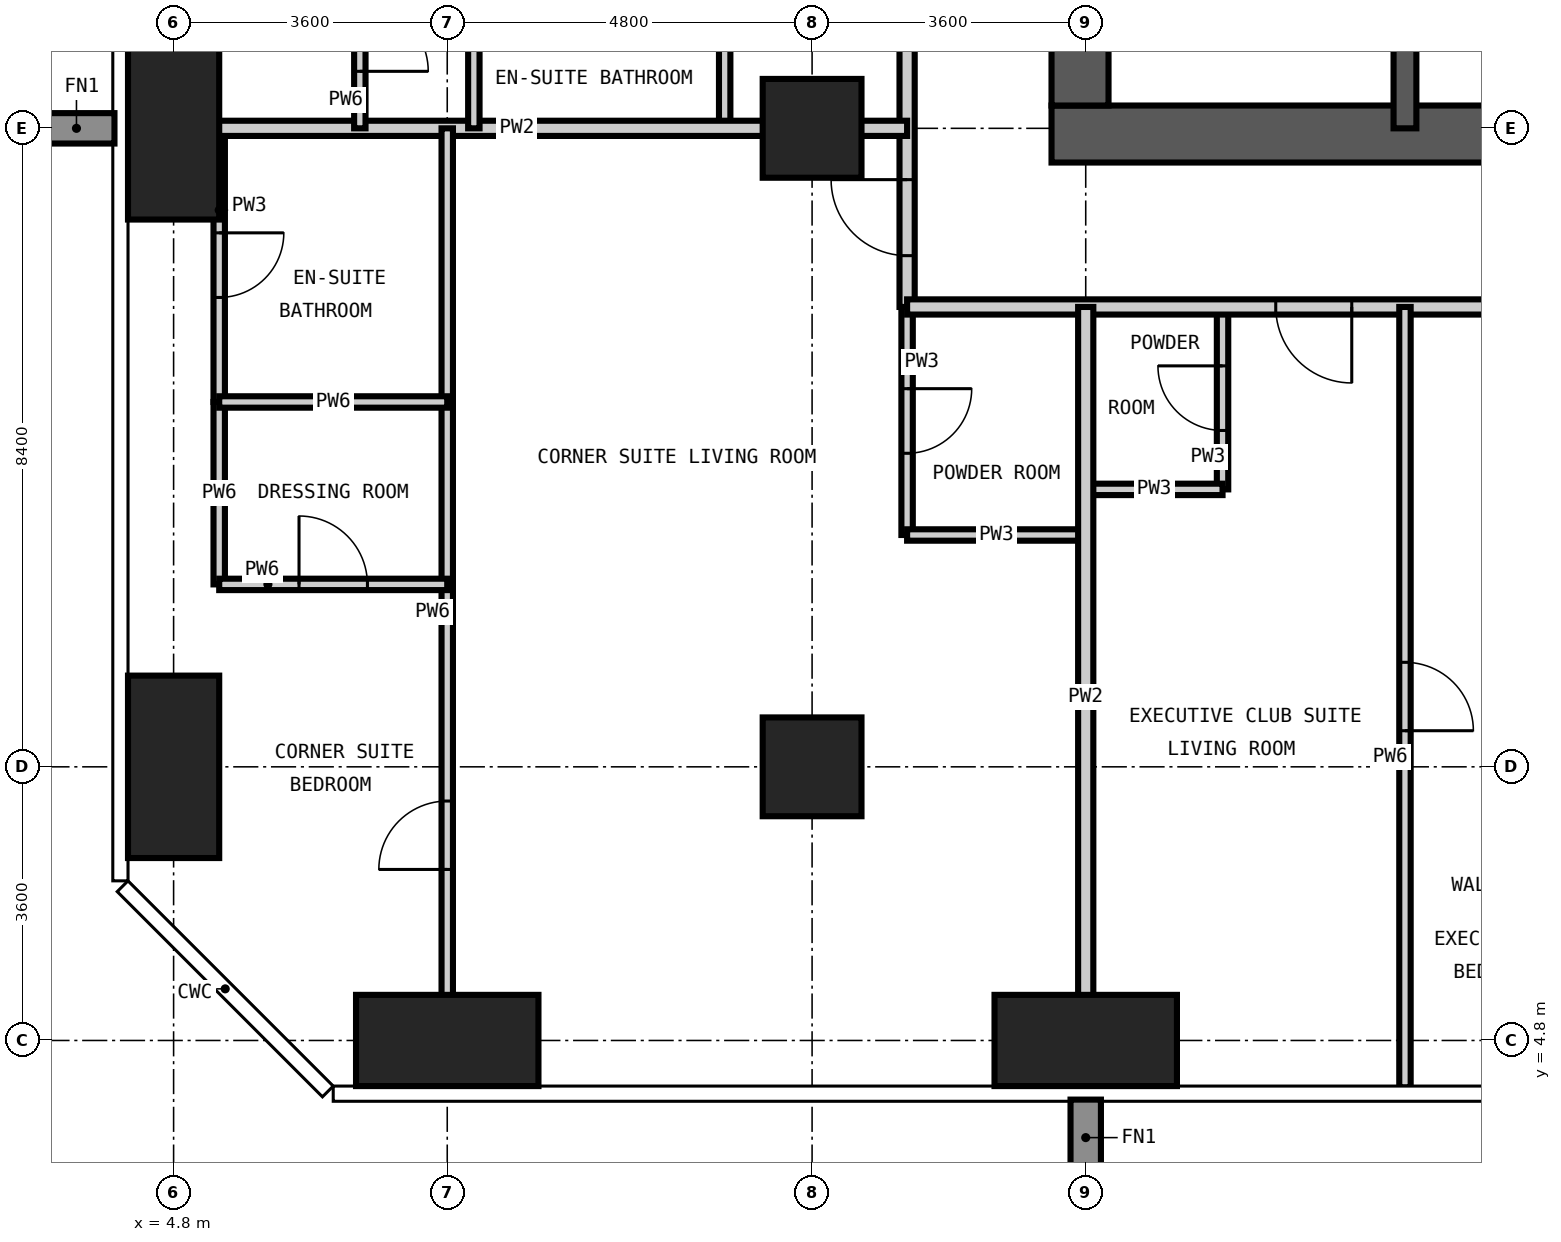
"""IFC4 building model, lengths in metres.
Left out: names, types, materials, properties, quantities, classifications, styles, units other than length and angle.
Written with IfcOpenShell. Run it as: python <this file> out.ifc"""

import sys

from ifc_helpers import new_model, si_unit, direction, frame, frame_2d, origin, origin_2d, place, context, subcontext, project, spatial, rectangle, extrude, element, fill, save


model = new_model("IFC4")
c1 = context("Model", 3, precision=1e-05, world=origin(), true_north=direction((0.0, 1.0)))
c2 = subcontext(c1, "Body", "Model", "MODEL_VIEW")
j1 = project(units=[si_unit("LENGTHUNIT", "METRE"), si_unit("PLANEANGLEUNIT", "RADIAN")], contexts=[c1])
p1 = place(None, origin())
s1 = spatial("IfcSite", under=j1, at=p1, CompositionType="ELEMENT")
p2 = place(p1, origin())
s2 = spatial("IfcBuilding", under=s1, at=p2, CompositionType="ELEMENT")
p3 = place(p2, frame((0.0, 0.0, 177.0)))
s3 = spatial("IfcBuildingStorey", under=s2, at=p3, CompositionType="ELEMENT", Elevation=177.0)
for number, where, z_axis, x_axis in (
    (1, (4.8, 8.4, -0.35), (0.0, 0.0, 1.0), (1.0, 0.0, 0.0)),
    (2, (4.8, 16.8, -0.35), (0.0, 0.0, 1.0), (1.0, 0.0, 0.0)),
):
    element("IfcColumn", number, at=place(p3, frame(where, z_axis=z_axis, x_axis=x_axis)), inside=s3, PredefinedType="COLUMN", context=c2, shape_type="SweptSolid", body=[
        extrude(rectangle(XDim=1.2, YDim=2.4, at=origin_2d()), origin(), (0.0, 0.0, 1.0), 3.6),
    ])
p4 = place(p3, frame((8.4, 4.8, -0.35), z_axis=(0.0, 0.0, 1.0), x_axis=(1.0, 0.0, 0.0)))
e3 = element("IfcColumn", 3, at=p4, inside=s3, PredefinedType="COLUMN", context=c2, shape_type="SweptSolid", body=[
    extrude(rectangle(XDim=2.4, YDim=1.2, at=origin_2d()), origin(), (0.0, 0.0, 1.0), 3.6),
])
for number, where, z_axis, x_axis in (
    (4, (13.2, 8.4, -0.35), (0.0, 0.0, 1.0), (1.0, 0.0, 0.0)),
    (5, (13.2, 16.8, -0.35), (0.0, 0.0, 1.0), (1.0, 0.0, 0.0)),
):
    element("IfcColumn", number, at=place(p3, frame(where, z_axis=z_axis, x_axis=x_axis)), inside=s3, PredefinedType="COLUMN", context=c2, shape_type="SweptSolid", body=[
        extrude(rectangle(XDim=1.3, YDim=1.3, at=origin_2d()), origin(), (0.0, 0.0, 1.0), 3.6),
    ])
p5 = place(p3, frame((16.8, 4.8, -0.35), z_axis=(0.0, 0.0, 1.0), x_axis=(1.0, 0.0, 0.0)))
e6 = element("IfcColumn", 6, at=p5, inside=s3, PredefinedType="COLUMN", context=c2, shape_type="SweptSolid", body=[
    extrude(rectangle(XDim=2.4, YDim=1.2, at=origin_2d()), origin(), (0.0, 0.0, 1.0), 3.6),
])
p6 = place(p3, frame((16.35, 16.725, -0.35), z_axis=(0.0, 0.0, 1.0), x_axis=(1.0, 0.0, 0.0)))
e7 = element("IfcWall", 7, at=p6, inside=s3, PredefinedType="SHEAR", context=c2, shape_type="SweptSolid", body=[
    extrude(rectangle(XDim=26.1, YDim=0.75, at=frame_2d((13.05, 0.0))), origin(), (0.0, 0.0, 1.0), 3.6),
])
p7 = place(p6, frame((12.55, 0.0, 0.35)))
e8 = element("IfcOpeningElement", 8, at=p7, cuts=e7, PredefinedType="OPENING", context=c2, shape_type="SweptSolid", body=[
    extrude(rectangle(XDim=1.0, YDim=2.1, at=frame_2d((0.5, 1.05))), frame((0.0, 0.385, 0.0), z_axis=(0.0, -1.0, 0.0), x_axis=(1.0, 0.0, 0.0)), (0.0, 0.0, 1.0), 0.77),
])
p8 = place(p6, frame((18.85, 0.0, 0.35)))
e9 = element("IfcOpeningElement", 9, at=p8, cuts=e7, PredefinedType="OPENING", context=c2, shape_type="SweptSolid", body=[
    extrude(rectangle(XDim=1.0, YDim=2.1, at=frame_2d((0.5, 1.05))), frame((0.0, 0.385, 0.0), z_axis=(0.0, -1.0, 0.0), x_axis=(1.0, 0.0, 0.0)), (0.0, 0.0, 1.0), 0.77),
])
p9 = place(p3, frame((16.725, 41.7, -0.35), z_axis=(0.0, 0.0, 1.0), x_axis=(0.0, -1.0, 0.0)))
e10 = element("IfcWall", 10, at=p9, inside=s3, PredefinedType="SHEAR", context=c2, shape_type="SweptSolid", body=[
    extrude(rectangle(XDim=24.6, YDim=0.75, at=frame_2d((12.3, 0.0))), origin(), (0.0, 0.0, 1.0), 3.6),
])
p10 = place(p9, frame((11.4, 0.0, 0.35)))
e11 = element("IfcOpeningElement", 11, at=p10, cuts=e10, PredefinedType="OPENING", context=c2, shape_type="SweptSolid", body=[
    extrude(rectangle(XDim=1.8, YDim=2.2, at=frame_2d((0.9, 1.1))), frame((0.0, 0.385, 0.0), z_axis=(0.0, -1.0, 0.0), x_axis=(1.0, 0.0, 0.0)), (0.0, 0.0, 1.0), 0.77),
])
p11 = place(p9, frame((20.2, 0.0, 0.35)))
e12 = element("IfcOpeningElement", 12, at=p11, cuts=e10, PredefinedType="OPENING", context=c2, shape_type="SweptSolid", body=[
    extrude(rectangle(XDim=1.0, YDim=2.1, at=frame_2d((0.5, 1.05))), frame((0.0, 0.385, 0.0), z_axis=(0.0, -1.0, 0.0), x_axis=(1.0, 0.0, 0.0)), (0.0, 0.0, 1.0), 0.77),
])
p12 = place(p9, frame((5.5, 0.0, 0.35)))
e13 = element("IfcOpeningElement", 13, at=p12, cuts=e10, PredefinedType="OPENING", context=c2, shape_type="SweptSolid", body=[
    extrude(rectangle(XDim=1.0, YDim=2.1, at=frame_2d((0.5, 1.05))), frame((0.0, 0.385, 0.0), z_axis=(0.0, -1.0, 0.0), x_axis=(1.0, 0.0, 0.0)), (0.0, 0.0, 1.0), 0.77),
])
p13 = place(p3, frame((21.0, 16.8, -0.35), z_axis=(0.0, 0.0, 1.0), x_axis=(0.0, 1.0, 0.0)))
e14 = element("IfcWall", 14, at=p13, inside=s3, PredefinedType="SHEAR", context=c2, shape_type="SweptSolid", body=[
    extrude(rectangle(XDim=2.8, YDim=0.3, at=frame_2d((1.4, 0.0))), origin(), (0.0, 0.0, 1.0), 3.6),
])
p14 = place(p3, frame((5.4, 13.2, 0.0), z_axis=(0.0, 0.0, 1.0), x_axis=(0.0, 1.0, 0.0)))
e15 = element("IfcWall", 15, at=p14, inside=s3, PredefinedType="PARTITIONING", context=c2, shape_type="SweptSolid", body=[
    extrude(rectangle(XDim=3.6, YDim=0.15, at=frame_2d((1.8, 0.0))), origin(), (0.0, 0.0, 1.0), 3.25),
])
p15 = place(p14, frame((1.375, 0.0, 0.0)))
e16 = element("IfcOpeningElement", 16, at=p15, cuts=e15, PredefinedType="OPENING", context=c2, shape_type="SweptSolid", body=[
    extrude(rectangle(XDim=0.85, YDim=2.1, at=frame_2d((0.425, 1.05))), frame((0.0, 0.085, 0.0), z_axis=(0.0, -1.0, 0.0), x_axis=(1.0, 0.0, 0.0)), (0.0, 0.0, 1.0), 0.17),
])
p16 = place(p3, frame((12.05, 16.8, 0.0), z_axis=(0.0, 0.0, 1.0), x_axis=(0.0, 1.0, 0.0)))
e17 = element("IfcWall", 17, at=p16, inside=s3, PredefinedType="PARTITIONING", context=c2, shape_type="SweptSolid", body=[
    extrude(rectangle(XDim=2.4, YDim=0.15, at=frame_2d((1.2, 0.0))), origin(), (0.0, 0.0, 1.0), 3.25),
])
p17 = place(p3, frame((14.45, 11.45, 0.0), z_axis=(0.0, 0.0, 1.0), x_axis=(0.0, 1.0, 0.0)))
e18 = element("IfcWall", 18, at=p17, inside=s3, PredefinedType="PARTITIONING", context=c2, shape_type="SweptSolid", body=[
    extrude(rectangle(XDim=3.0, YDim=0.15, at=frame_2d((1.5, 0.0))), origin(), (0.0, 0.0, 1.0), 3.25),
])
p18 = place(p17, frame((1.075, 0.0, 0.0)))
e19 = element("IfcOpeningElement", 19, at=p18, cuts=e18, PredefinedType="OPENING", context=c2, shape_type="SweptSolid", body=[
    extrude(rectangle(XDim=0.85, YDim=2.1, at=frame_2d((0.425, 1.05))), frame((0.0, 0.085, 0.0), z_axis=(0.0, -1.0, 0.0), x_axis=(1.0, 0.0, 0.0)), (0.0, 0.0, 1.0), 0.17),
])
p19 = place(p3, frame((18.6, 12.05, 0.0), z_axis=(0.0, 0.0, 1.0), x_axis=(0.0, 1.0, 0.0)))
e20 = element("IfcWall", 20, at=p19, inside=s3, PredefinedType="PARTITIONING", context=c2, shape_type="SweptSolid", body=[
    extrude(rectangle(XDim=2.4, YDim=0.15, at=frame_2d((1.2, 0.0))), origin(), (0.0, 0.0, 1.0), 3.25),
])
p20 = place(p19, frame((0.775, 0.0, 0.0)))
e21 = element("IfcOpeningElement", 21, at=p20, cuts=e20, PredefinedType="OPENING", context=c2, shape_type="SweptSolid", body=[
    extrude(rectangle(XDim=0.85, YDim=2.1, at=frame_2d((0.425, 1.05))), frame((0.0, 0.085, 0.0), z_axis=(0.0, -1.0, 0.0), x_axis=(1.0, 0.0, 0.0)), (0.0, 0.0, 1.0), 0.17),
])
p21 = place(p3, frame((14.45, 11.45, 0.0), z_axis=(0.0, 0.0, 1.0), x_axis=(1.0, 0.0, 0.0)))
e22 = element("IfcWall", 22, at=p21, inside=s3, PredefinedType="PARTITIONING", context=c2, shape_type="SweptSolid", body=[
    extrude(rectangle(XDim=2.35, YDim=0.15, at=frame_2d((1.175, 0.0))), origin(), (0.0, 0.0, 1.0), 3.25),
])
p22 = place(p3, frame((16.8, 12.05, 0.0), z_axis=(0.0, 0.0, 1.0), x_axis=(1.0, 0.0, 0.0)))
e23 = element("IfcWall", 23, at=p22, inside=s3, PredefinedType="PARTITIONING", context=c2, shape_type="SweptSolid", body=[
    extrude(rectangle(XDim=1.8, YDim=0.15, at=frame_2d((0.9, 0.0))), origin(), (0.0, 0.0, 1.0), 3.25),
])
p23 = place(p3, frame((14.45, 14.45, 0.0), z_axis=(0.0, 0.0, 1.0), x_axis=(0.0, 1.0, 0.0)))
e24 = element("IfcWall", 24, at=p23, inside=s3, PredefinedType="PARTITIONING", context=c2, shape_type="SweptSolid", body=[
    extrude(rectangle(XDim=31.1, YDim=0.2, at=frame_2d((15.55, 0.0))), origin(), (0.0, 0.0, 1.0), 3.25),
])
p24 = place(p23, frame((6.05, 0.0, 0.0)))
e25 = element("IfcOpeningElement", 25, at=p24, cuts=e24, PredefinedType="OPENING", context=c2, shape_type="SweptSolid", body=[
    extrude(rectangle(XDim=1.0, YDim=2.2, at=frame_2d((0.5, 1.1))), frame((0.0, 0.11, 0.0), z_axis=(0.0, -1.0, 0.0), x_axis=(1.0, 0.0, 0.0)), (0.0, 0.0, 1.0), 0.22),
])
p25 = place(p23, frame((11.95, 0.0, 0.0)))
e26 = element("IfcOpeningElement", 26, at=p25, cuts=e24, PredefinedType="OPENING", context=c2, shape_type="SweptSolid", body=[
    extrude(rectangle(XDim=1.8, YDim=2.4, at=frame_2d((0.9, 1.2))), frame((0.0, 0.11, 0.0), z_axis=(0.0, -1.0, 0.0), x_axis=(1.0, 0.0, 0.0)), (0.0, 0.0, 1.0), 0.22),
])
p26 = place(p23, frame((19.575, 0.0, 0.0)))
e27 = element("IfcOpeningElement", 27, at=p26, cuts=e24, PredefinedType="OPENING", context=c2, shape_type="SweptSolid", body=[
    extrude(rectangle(XDim=1.0, YDim=2.2, at=frame_2d((0.5, 1.1))), frame((0.0, 0.11, 0.0), z_axis=(0.0, -1.0, 0.0), x_axis=(1.0, 0.0, 0.0)), (0.0, 0.0, 1.0), 0.22),
])
p27 = place(p23, frame((24.95, 0.0, 0.0)))
e28 = element("IfcOpeningElement", 28, at=p27, cuts=e24, PredefinedType="OPENING", context=c2, shape_type="SweptSolid", body=[
    extrude(rectangle(XDim=1.0, YDim=2.2, at=frame_2d((0.5, 1.1))), frame((0.0, 0.11, 0.0), z_axis=(0.0, -1.0, 0.0), x_axis=(1.0, 0.0, 0.0)), (0.0, 0.0, 1.0), 0.22),
])
p28 = place(p23, frame((0.675, 0.0, 0.0)))
e29 = element("IfcOpeningElement", 29, at=p28, cuts=e24, PredefinedType="OPENING", context=c2, shape_type="SweptSolid", body=[
    extrude(rectangle(XDim=1.0, YDim=2.2, at=frame_2d((0.5, 1.1))), frame((0.0, 0.11, 0.0), z_axis=(0.0, -1.0, 0.0), x_axis=(1.0, 0.0, 0.0)), (0.0, 0.0, 1.0), 0.22),
])
p29 = place(p23, frame((28.825, 0.0, 0.0)))
e30 = element("IfcOpeningElement", 30, at=p29, cuts=e24, PredefinedType="OPENING", context=c2, shape_type="SweptSolid", body=[
    extrude(rectangle(XDim=1.0, YDim=2.2, at=frame_2d((0.5, 1.1))), frame((0.0, 0.11, 0.0), z_axis=(0.0, -1.0, 0.0), x_axis=(1.0, 0.0, 0.0)), (0.0, 0.0, 1.0), 0.22),
])
p30 = place(p3, frame((44.95, 14.45, 0.0), z_axis=(0.0, 0.0, 1.0), x_axis=(-1.0, 0.0, 0.0)))
e31 = element("IfcWall", 31, at=p30, inside=s3, PredefinedType="PARTITIONING", context=c2, shape_type="SweptSolid", body=[
    extrude(rectangle(XDim=30.5, YDim=0.2, at=frame_2d((15.25, 0.0))), origin(), (0.0, 0.0, 1.0), 3.25),
])
p31 = place(p30, frame((24.65, 0.0, 0.0)))
e32 = element("IfcOpeningElement", 32, at=p31, cuts=e31, PredefinedType="OPENING", context=c2, shape_type="SweptSolid", body=[
    extrude(rectangle(XDim=1.0, YDim=2.2, at=frame_2d((0.5, 1.1))), frame((0.0, 0.11, 0.0), z_axis=(0.0, -1.0, 0.0), x_axis=(1.0, 0.0, 0.0)), (0.0, 0.0, 1.0), 0.22),
])
p32 = place(p30, frame((13.85, 0.0, 0.0)))
e33 = element("IfcOpeningElement", 33, at=p32, cuts=e31, PredefinedType="OPENING", context=c2, shape_type="SweptSolid", body=[
    extrude(rectangle(XDim=1.0, YDim=2.2, at=frame_2d((0.5, 1.1))), frame((0.0, 0.11, 0.0), z_axis=(0.0, -1.0, 0.0), x_axis=(1.0, 0.0, 0.0)), (0.0, 0.0, 1.0), 0.22),
])
p33 = place(p30, frame((7.85, 0.0, 0.0)))
e34 = element("IfcOpeningElement", 34, at=p33, cuts=e31, PredefinedType="OPENING", context=c2, shape_type="SweptSolid", body=[
    extrude(rectangle(XDim=1.0, YDim=2.2, at=frame_2d((0.5, 1.1))), frame((0.0, 0.11, 0.0), z_axis=(0.0, -1.0, 0.0), x_axis=(1.0, 0.0, 0.0)), (0.0, 0.0, 1.0), 0.22),
])
for number, where, z_axis, x_axis in (
    (35, (16.8, 4.182, 0.0), (0.0, 0.0, 1.0), (0.0, 1.0, 0.0)),
    (36, (4.182, 16.8, 0.0), (0.0, 0.0, 1.0), (1.0, 0.0, 0.0)),
):
    element("IfcWall", number, at=place(p3, frame(where, z_axis=z_axis, x_axis=x_axis)), inside=s3, PredefinedType="PARTITIONING", context=c2, shape_type="SweptSolid", body=[
        extrude(rectangle(XDim=10.268, YDim=0.2, at=frame_2d((5.134, 0.0))), origin(), (0.0, 0.0, 1.0), 3.25),
    ])
p34 = place(p3, frame((5.4, 10.8, 0.0), z_axis=(0.0, 0.0, 1.0), x_axis=(0.0, 1.0, 0.0)))
e37 = element("IfcWall", 37, at=p34, inside=s3, PredefinedType="PARTITIONING", context=c2, shape_type="SweptSolid", body=[
    extrude(rectangle(XDim=2.4, YDim=0.15, at=frame_2d((1.2, 0.0))), origin(), (0.0, 0.0, 1.0), 3.25),
])
p35 = place(p3, frame((7.25, 16.8, 0.0), z_axis=(0.0, 0.0, 1.0), x_axis=(0.0, 1.0, 0.0)))
e38 = element("IfcWall", 38, at=p35, inside=s3, PredefinedType="PARTITIONING", context=c2, shape_type="SweptSolid", body=[
    extrude(rectangle(XDim=2.4, YDim=0.15, at=frame_2d((1.2, 0.0))), origin(), (0.0, 0.0, 1.0), 3.25),
])
p36 = place(p35, frame((0.75, 0.0, 0.0)))
e39 = element("IfcOpeningElement", 39, at=p36, cuts=e38, PredefinedType="OPENING", context=c2, shape_type="SweptSolid", body=[
    extrude(rectangle(XDim=0.9, YDim=2.1, at=frame_2d((0.45, 1.05))), frame((0.0, 0.085, 0.0), z_axis=(0.0, -1.0, 0.0), x_axis=(1.0, 0.0, 0.0)), (0.0, 0.0, 1.0), 0.17),
])
p37 = place(p3, frame((8.4, 4.182, 0.0), z_axis=(0.0, 0.0, 1.0), x_axis=(0.0, 1.0, 0.0)))
e40 = element("IfcWall", 40, at=p37, inside=s3, PredefinedType="PARTITIONING", context=c2, shape_type="SweptSolid", body=[
    extrude(rectangle(XDim=12.618, YDim=0.15, at=frame_2d((6.309, 0.0))), origin(), (0.0, 0.0, 1.0), 3.25),
])
p38 = place(p37, frame((2.868, 0.0, 0.0)))
e41 = element("IfcOpeningElement", 41, at=p38, cuts=e40, PredefinedType="OPENING", context=c2, shape_type="SweptSolid", body=[
    extrude(rectangle(XDim=0.9, YDim=2.1, at=frame_2d((0.45, 1.05))), frame((0.0, 0.085, 0.0), z_axis=(0.0, -1.0, 0.0), x_axis=(1.0, 0.0, 0.0)), (0.0, 0.0, 1.0), 0.17),
])
p39 = place(p3, frame((8.75, 16.8, 0.0), z_axis=(0.0, 0.0, 1.0), x_axis=(0.0, 1.0, 0.0)))
e42 = element("IfcWall", 42, at=p39, inside=s3, PredefinedType="PARTITIONING", context=c2, shape_type="SweptSolid", body=[
    extrude(rectangle(XDim=2.4, YDim=0.15, at=frame_2d((1.2, 0.0))), origin(), (0.0, 0.0, 1.0), 3.25),
])
p40 = place(p3, frame((21.0, 4.182, 0.0), z_axis=(0.0, 0.0, 1.0), x_axis=(0.0, 1.0, 0.0)))
e43 = element("IfcWall", 43, at=p40, inside=s3, PredefinedType="PARTITIONING", context=c2, shape_type="SweptSolid", body=[
    extrude(rectangle(XDim=10.268, YDim=0.15, at=frame_2d((5.134, 0.0))), origin(), (0.0, 0.0, 1.0), 3.25),
])
p41 = place(p40, frame((4.693, 0.0, 0.0)))
e44 = element("IfcOpeningElement", 44, at=p41, cuts=e43, PredefinedType="OPENING", context=c2, shape_type="SweptSolid", body=[
    extrude(rectangle(XDim=0.9, YDim=2.1, at=frame_2d((0.45, 1.05))), frame((0.0, 0.085, 0.0), z_axis=(0.0, -1.0, 0.0), x_axis=(1.0, 0.0, 0.0)), (0.0, 0.0, 1.0), 0.17),
])
p42 = place(p3, frame((5.4, 10.8, 0.0), z_axis=(0.0, 0.0, 1.0), x_axis=(1.0, 0.0, 0.0)))
e45 = element("IfcWall", 45, at=p42, inside=s3, PredefinedType="PARTITIONING", context=c2, shape_type="SweptSolid", body=[
    extrude(rectangle(XDim=3.0, YDim=0.15, at=frame_2d((1.5, 0.0))), origin(), (0.0, 0.0, 1.0), 3.25),
])
p43 = place(p42, frame((1.05, 0.0, 0.0)))
e46 = element("IfcOpeningElement", 46, at=p43, cuts=e45, PredefinedType="OPENING", context=c2, shape_type="SweptSolid", body=[
    extrude(rectangle(XDim=0.9, YDim=2.1, at=frame_2d((0.45, 1.05))), frame((0.0, 0.085, 0.0), z_axis=(0.0, -1.0, 0.0), x_axis=(1.0, 0.0, 0.0)), (0.0, 0.0, 1.0), 0.17),
])
p44 = place(p3, frame((5.4, 13.2, 0.0), z_axis=(0.0, 0.0, 1.0), x_axis=(1.0, 0.0, 0.0)))
e47 = element("IfcWall", 47, at=p44, inside=s3, PredefinedType="PARTITIONING", context=c2, shape_type="SweptSolid", body=[
    extrude(rectangle(XDim=3.0, YDim=0.15, at=frame_2d((1.5, 0.0))), origin(), (0.0, 0.0, 1.0), 3.25),
])
p45 = place(p31, origin())
e48 = element("IfcDoor", 48, at=p45, inside=s3, OperationType="SINGLE_SWING_LEFT", PredefinedType="DOOR", context=c2, shape_type="SweptSolid", body=[
    extrude(rectangle(XDim=1.0, YDim=2.2, at=frame_2d((0.5, 1.1))), frame((0.0, 0.025, 0.0), z_axis=(0.0, -1.0, 0.0), x_axis=(1.0, 0.0, 0.0)), (0.0, 0.0, 1.0), 0.05),
])
fill(e32, e48)
p46 = place(p20, origin())
e49 = element("IfcDoor", 49, at=p46, inside=s3, OperationType="SINGLE_SWING_RIGHT", PredefinedType="DOOR", context=c2, shape_type="SweptSolid", body=[
    extrude(rectangle(XDim=0.85, YDim=2.1, at=frame_2d((0.425, 1.05))), frame((0.0, 0.025, 0.0), z_axis=(0.0, -1.0, 0.0), x_axis=(1.0, 0.0, 0.0)), (0.0, 0.0, 1.0), 0.05),
])
fill(e21, e49)
p47 = place(p41, frame((0.9, 0.0, 0.0), z_axis=(0.0, 0.0, 1.0), x_axis=(-1.0, 0.0, 0.0)))
e50 = element("IfcDoor", 50, at=p47, inside=s3, OperationType="SINGLE_SWING_RIGHT", PredefinedType="DOOR", context=c2, shape_type="SweptSolid", body=[
    extrude(rectangle(XDim=0.9, YDim=2.1, at=frame_2d((0.45, 1.05))), frame((0.0, 0.025, 0.0), z_axis=(0.0, -1.0, 0.0), x_axis=(1.0, 0.0, 0.0)), (0.0, 0.0, 1.0), 0.05),
])
fill(e44, e50)
p48 = place(p36, frame((0.9, 0.0, 0.0), z_axis=(0.0, 0.0, 1.0), x_axis=(-1.0, 0.0, 0.0)))
e51 = element("IfcDoor", 51, at=p48, inside=s3, OperationType="SINGLE_SWING_RIGHT", PredefinedType="DOOR", context=c2, shape_type="SweptSolid", body=[
    extrude(rectangle(XDim=0.9, YDim=2.1, at=frame_2d((0.45, 1.05))), frame((0.0, 0.025, 0.0), z_axis=(0.0, -1.0, 0.0), x_axis=(1.0, 0.0, 0.0)), (0.0, 0.0, 1.0), 0.05),
])
fill(e39, e51)
p49 = place(p28, origin())
e52 = element("IfcDoor", 52, at=p49, inside=s3, OperationType="SINGLE_SWING_RIGHT", PredefinedType="DOOR", context=c2, shape_type="SweptSolid", body=[
    extrude(rectangle(XDim=1.0, YDim=2.2, at=frame_2d((0.5, 1.1))), frame((0.0, 0.025, 0.0), z_axis=(0.0, -1.0, 0.0), x_axis=(1.0, 0.0, 0.0)), (0.0, 0.0, 1.0), 0.05),
])
fill(e29, e52)
p50 = place(p18, frame((0.85, 0.0, 0.0), z_axis=(0.0, 0.0, 1.0), x_axis=(-1.0, 0.0, 0.0)))
e53 = element("IfcDoor", 53, at=p50, inside=s3, OperationType="SINGLE_SWING_LEFT", PredefinedType="DOOR", context=c2, shape_type="SweptSolid", body=[
    extrude(rectangle(XDim=0.85, YDim=2.1, at=frame_2d((0.425, 1.05))), frame((0.0, 0.025, 0.0), z_axis=(0.0, -1.0, 0.0), x_axis=(1.0, 0.0, 0.0)), (0.0, 0.0, 1.0), 0.05),
])
fill(e19, e53)
p51 = place(p38, origin())
e54 = element("IfcDoor", 54, at=p51, inside=s3, OperationType="SINGLE_SWING_LEFT", PredefinedType="DOOR", context=c2, shape_type="SweptSolid", body=[
    extrude(rectangle(XDim=0.9, YDim=2.1, at=frame_2d((0.45, 1.05))), frame((0.0, 0.025, 0.0), z_axis=(0.0, -1.0, 0.0), x_axis=(1.0, 0.0, 0.0)), (0.0, 0.0, 1.0), 0.05),
])
fill(e41, e54)
p52 = place(p15, frame((0.85, 0.0, 0.0), z_axis=(0.0, 0.0, 1.0), x_axis=(-1.0, 0.0, 0.0)))
e55 = element("IfcDoor", 55, at=p52, inside=s3, OperationType="SINGLE_SWING_LEFT", PredefinedType="DOOR", context=c2, shape_type="SweptSolid", body=[
    extrude(rectangle(XDim=0.85, YDim=2.1, at=frame_2d((0.425, 1.05))), frame((0.0, 0.025, 0.0), z_axis=(0.0, -1.0, 0.0), x_axis=(1.0, 0.0, 0.0)), (0.0, 0.0, 1.0), 0.05),
])
fill(e16, e55)
p53 = place(p43, origin())
e56 = element("IfcDoor", 56, at=p53, inside=s3, OperationType="SINGLE_SWING_LEFT", PredefinedType="DOOR", context=c2, shape_type="SweptSolid", body=[
    extrude(rectangle(XDim=0.9, YDim=2.1, at=frame_2d((0.45, 1.05))), frame((0.0, 0.025, 0.0), z_axis=(0.0, -1.0, 0.0), x_axis=(1.0, 0.0, 0.0)), (0.0, 0.0, 1.0), 0.05),
])
fill(e46, e56)
save(model, sys.argv[1])
